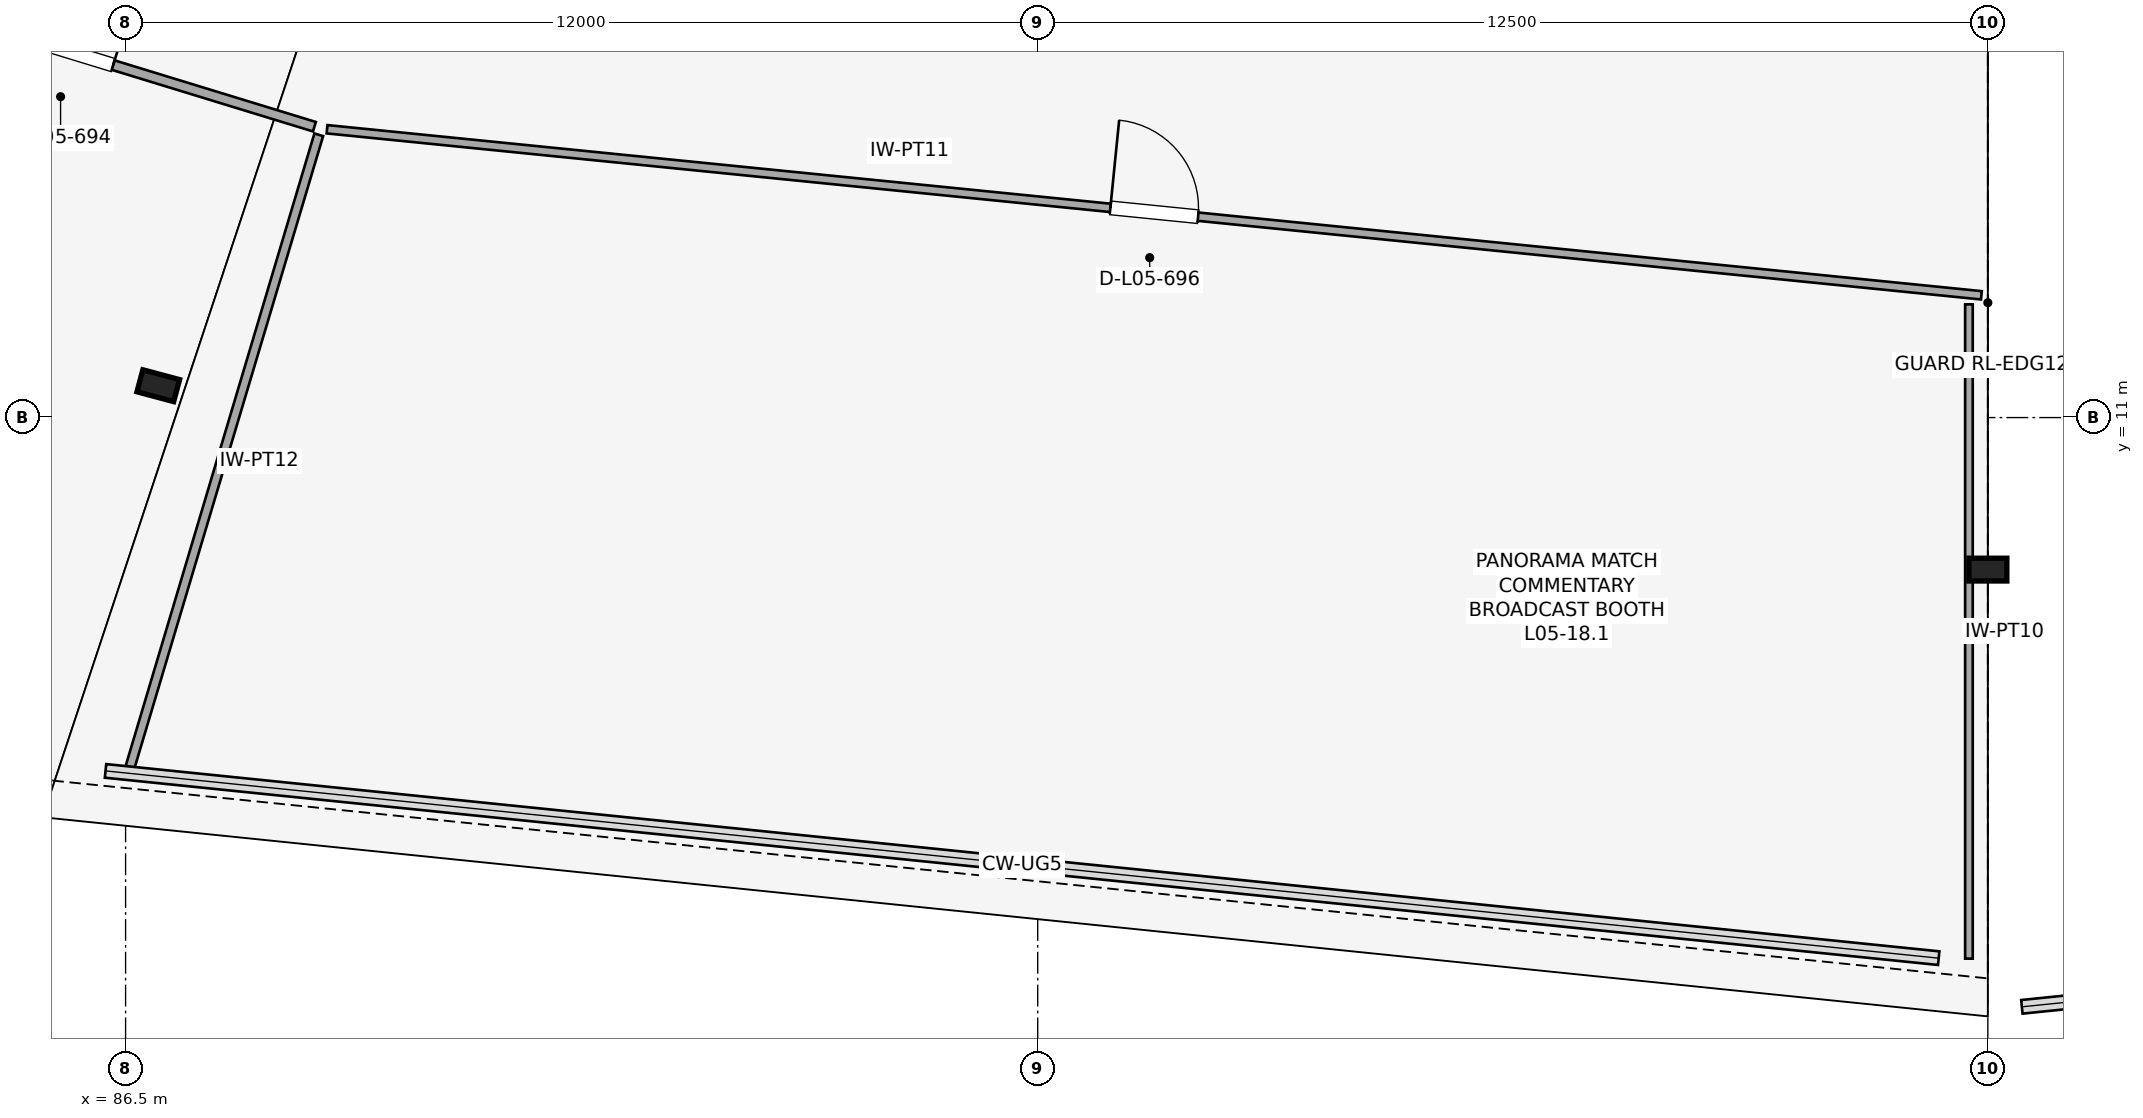
"""IFC4 building model, lengths in metres.
Left out: names, types, materials, properties, quantities, classifications, styles, units other than length and angle.
Written with IfcOpenShell. Run it as: python <this file> out.ifc"""

import sys

from ifc_helpers import new_model, si_unit, direction, frame, frame_2d, origin, origin_2d, place, context, subcontext, project, spatial, rectangle, i_section, extrude, element, fill, save


model = new_model("IFC4")
c1 = context("Model", 3, precision=1e-05, world=origin(), true_north=direction((0.0, 1.0)))
c2 = subcontext(c1, "Body", "Model", "MODEL_VIEW")
j1 = project(units=[si_unit("LENGTHUNIT", "METRE"), si_unit("PLANEANGLEUNIT", "RADIAN")], contexts=[c1])
p1 = place(None, origin())
s1 = spatial("IfcSite", under=j1, at=p1, CompositionType="ELEMENT")
p2 = place(p1, origin())
s2 = spatial("IfcBuilding", under=s1, at=p2, CompositionType="ELEMENT")
p3 = place(p2, frame((0.0, 0.0, 26.2)))
s3 = spatial("IfcBuildingStorey", under=s2, at=p3, CompositionType="ELEMENT", Elevation=26.2)
for number, where, z_axis, x_axis in (
    (1, (86.93, 11.419, 0.0), (0.0, 0.0, 1.0), (-0.259, -0.966, 0.0)),
    (2, (111.0, 9.0, 0.0), (0.0, 0.0, 1.0), (0.0, -1.0, 0.0)),
):
    element("IfcColumn", number, at=place(p3, frame(where, z_axis=z_axis, x_axis=x_axis)), inside=s3, PredefinedType="COLUMN", context=c2, shape_type="SweptSolid", body=[
        extrude(i_section(OverallWidth=0.3, OverallDepth=0.5, WebThickness=0.014, FlangeThickness=0.028, FilletRadius=0.027, at=origin_2d()), origin(), (0.0, 0.0, 1.0), 5.6),
    ])
p4 = place(p3, frame((82.656, 16.764, 0.0), z_axis=(0.0, 0.0, 1.0), x_axis=(0.956207119829, -0.29269086762, 0.0)))
e3 = element("IfcWall", 3, at=p4, inside=s3, PredefinedType="PARTITIONING", context=c2, shape_type="SweptSolid", body=[
    extrude(rectangle(XDim=6.618, YDim=0.13, at=frame_2d((3.309, 0.0))), origin(), (0.0, 0.0, 1.0), 4.1),
])
p5 = place(p4, frame((2.769, 0.0, 0.0)))
e4 = element("IfcOpeningElement", 4, at=p5, cuts=e3, PredefinedType="OPENING", context=c2, shape_type="SweptSolid", body=[
    extrude(rectangle(XDim=1.08, YDim=2.24, at=frame_2d((0.54, 1.12))), frame((0.0, 0.075, 0.0), z_axis=(0.0, -1.0, 0.0), x_axis=(1.0, 0.0, 0.0)), (0.0, 0.0, 1.0), 0.15),
])
p6 = place(p3, frame((89.041, 14.72, 0.0), z_axis=(0.0, 0.0, 1.0), x_axis=(-0.285961904243, -0.958240987081, 0.0)))
e5 = element("IfcWall", 5, at=p6, inside=s3, PredefinedType="PARTITIONING", context=c2, shape_type="SweptSolid", body=[
    extrude(rectangle(XDim=8.68, YDim=0.12, at=frame_2d((4.34, 0.0))), origin(), (0.0, 0.0, 1.0), 4.1),
])
p7 = place(p3, frame((89.15, 14.793, 0.0), z_axis=(0.0, 0.0, 1.0), x_axis=(0.99499954773, -0.099879427399, 0.0)))
e6 = element("IfcWall", 6, at=p7, inside=s3, PredefinedType="PARTITIONING", context=c2, shape_type="SweptSolid", body=[
    extrude(rectangle(XDim=21.875, YDim=0.11, at=frame_2d((10.937, 0.0))), origin(), (0.0, 0.0, 1.0), 4.1),
])
p8 = place(p7, frame((10.357, 0.0, 0.0)))
e7 = element("IfcOpeningElement", 7, at=p8, cuts=e6, PredefinedType="OPENING", context=c2, shape_type="SweptSolid", body=[
    extrude(rectangle(XDim=1.16, YDim=2.1, at=frame_2d((0.58, 1.05))), frame((0.0, 0.065, 0.0), z_axis=(0.0, -1.0, 0.0), x_axis=(1.0, 0.0, 0.0)), (0.0, 0.0, 1.0), 0.13),
])
p9 = place(p3, frame((110.751, 12.49, 0.0), z_axis=(0.0, 0.0, 1.0), x_axis=(0.0, -1.0, 0.0)))
e8 = element("IfcWall", 8, at=p9, inside=s3, PredefinedType="PARTITIONING", context=c2, shape_type="SweptSolid", body=[
    extrude(rectangle(XDim=8.608, YDim=0.1, at=frame_2d((4.304, 0.0))), origin(), (0.0, 0.0, 1.0), 4.1),
])
p10 = place(p5, origin())
e9 = element("IfcDoor", 9, at=p10, inside=s3, OperationType="SINGLE_SWING_RIGHT", PredefinedType="DOOR", context=c2, shape_type="SweptSolid", body=[
    extrude(rectangle(XDim=1.08, YDim=2.24, at=frame_2d((0.54, 1.12))), frame((0.0, 0.025, 0.0), z_axis=(0.0, -1.0, 0.0), x_axis=(1.0, 0.0, 0.0)), (0.0, 0.0, 1.0), 0.05),
])
fill(e4, e9)
p11 = place(p8, origin())
e10 = element("IfcDoor", 10, at=p11, inside=s3, OperationType="SINGLE_SWING_LEFT", PredefinedType="DOOR", context=c2, shape_type="SweptSolid", body=[
    extrude(rectangle(XDim=1.16, YDim=2.1, at=frame_2d((0.58, 1.05))), frame((0.0, 0.025, 0.0), z_axis=(0.0, -1.0, 0.0), x_axis=(1.0, 0.0, 0.0)), (0.0, 0.0, 1.0), 0.05),
])
fill(e7, e10)
save(model, sys.argv[1])
